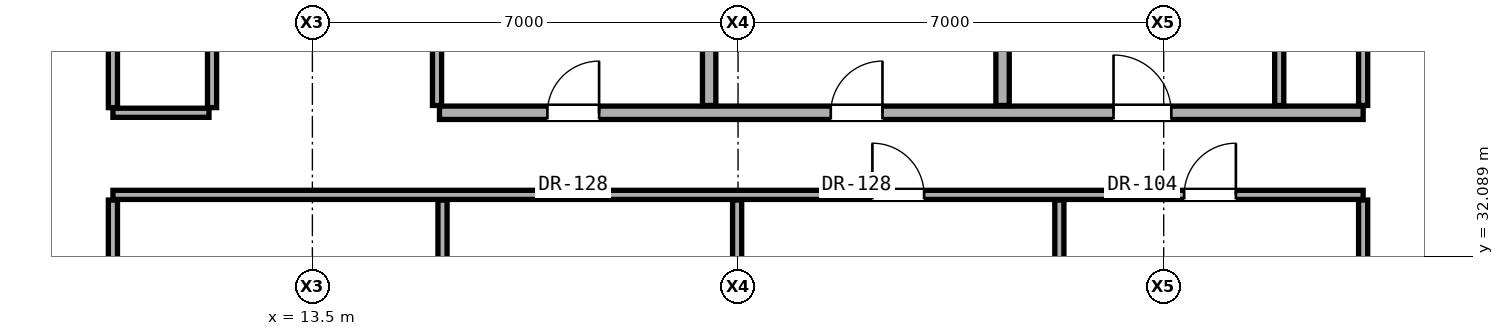
"""IFC4 building model, lengths in metres.
Left out: names, types, materials, properties, quantities, classifications, styles, units other than length and angle.
Written with IfcOpenShell. Run it as: python <this file> out.ifc"""

import sys

from ifc_helpers import new_model, si_unit, direction, frame, frame_2d, origin, place, context, subcontext, project, spatial, rectangle, extrude, element, fill, save


model = new_model("IFC4")
c1 = context("Model", 3, precision=1e-05, world=origin(), true_north=direction((0.0, 1.0)))
c2 = subcontext(c1, "Body", "Model", "MODEL_VIEW")
j1 = project(units=[si_unit("LENGTHUNIT", "METRE"), si_unit("PLANEANGLEUNIT", "RADIAN")], contexts=[c1])
p1 = place(None, origin())
s1 = spatial("IfcSite", under=j1, at=p1, CompositionType="ELEMENT")
p2 = place(p1, origin())
s2 = spatial("IfcBuilding", under=s1, at=p2, CompositionType="ELEMENT")
p3 = place(p2, frame((0.0, 0.0, 186.9)))
s3 = spatial("IfcBuildingStorey", under=s2, at=p3, CompositionType="ELEMENT", Elevation=186.9)
p4 = place(p3, frame((10.22, 33.1, 0.0), z_axis=(0.0, 0.0, 1.0), x_axis=(1.0, 0.0, 0.0)))
e1 = element("IfcWall", 1, at=p4, inside=s3, PredefinedType="PARTITIONING", context=c2, shape_type="SweptSolid", body=[
    extrude(rectangle(XDim=20.56, YDim=0.15, at=frame_2d((10.28, 0.0))), origin(), (0.0, 0.0, 1.0), 2.186),
])
p5 = place(p4, frame((12.49, 0.0, 0.0)))
e2 = element("IfcOpeningElement", 2, at=p5, cuts=e1, PredefinedType="OPENING", context=c2, shape_type="SweptSolid", body=[
    extrude(rectangle(XDim=0.85, YDim=2.01, at=frame_2d((0.425, 1.005))), frame((0.0, 0.085, 0.0), z_axis=(0.0, -1.0, 0.0), x_axis=(1.0, 0.0, 0.0)), (0.0, 0.0, 1.0), 0.17),
])
p6 = place(p4, frame((17.617, 0.0, 0.0)))
e3 = element("IfcOpeningElement", 3, at=p6, cuts=e1, PredefinedType="OPENING", context=c2, shape_type="SweptSolid", body=[
    extrude(rectangle(XDim=0.85, YDim=2.01, at=frame_2d((0.425, 1.005))), frame((0.0, 0.085, 0.0), z_axis=(0.0, -1.0, 0.0), x_axis=(1.0, 0.0, 0.0)), (0.0, 0.0, 1.0), 0.17),
])
p7 = place(p3, frame((10.22, 34.45, 0.0), z_axis=(0.0, 0.0, 1.0), x_axis=(1.0, 0.0, 0.0)))
e4 = element("IfcWall", 4, at=p7, inside=s3, PredefinedType="PARTITIONING", context=c2, shape_type="SweptSolid", body=[
    extrude(rectangle(XDim=1.58, YDim=0.15, at=frame_2d((0.79, 0.0))), origin(), (0.0, 0.0, 1.0), 2.186),
])
p8 = place(p3, frame((15.59, 34.45, 0.0), z_axis=(0.0, 0.0, 1.0), x_axis=(1.0, 0.0, 0.0)))
e5 = element("IfcWall", 5, at=p8, inside=s3, PredefinedType="SOLIDWALL", context=c2, shape_type="SweptSolid", body=[
    extrude(rectangle(XDim=15.19, YDim=0.22, at=frame_2d((7.595, 0.0))), origin(), (0.0, 0.0, 1.0), 2.186),
])
p9 = place(p8, frame((6.435, 0.0, 0.0)))
e6 = element("IfcOpeningElement", 6, at=p9, cuts=e5, PredefinedType="OPENING", context=c2, shape_type="SweptSolid", body=[
    extrude(rectangle(XDim=0.85, YDim=2.01, at=frame_2d((0.425, 1.005))), frame((0.0, 0.12, 0.0), z_axis=(0.0, -1.0, 0.0), x_axis=(1.0, 0.0, 0.0)), (0.0, 0.0, 1.0), 0.24),
])
p10 = place(p8, frame((11.085, 0.0, 0.0)))
e7 = element("IfcOpeningElement", 7, at=p10, cuts=e5, PredefinedType="OPENING", context=c2, shape_type="SweptSolid", body=[
    extrude(rectangle(XDim=0.95, YDim=2.15, at=frame_2d((0.475, 1.075))), frame((0.0, 0.12, 0.0), z_axis=(0.0, -1.0, 0.0), x_axis=(1.0, 0.0, 0.0)), (0.0, 0.0, 1.0), 0.24),
])
p11 = place(p8, frame((1.775, 0.0, 0.0)))
e8 = element("IfcOpeningElement", 8, at=p11, cuts=e5, PredefinedType="OPENING", context=c2, shape_type="SweptSolid", body=[
    extrude(rectangle(XDim=0.85, YDim=2.01, at=frame_2d((0.425, 1.005))), frame((0.0, 0.12, 0.0), z_axis=(0.0, -1.0, 0.0), x_axis=(1.0, 0.0, 0.0)), (0.0, 0.0, 1.0), 0.24),
])
p12 = place(p3, frame((10.22, 22.935, 0.0), z_axis=(0.0, 0.0, 1.0), x_axis=(0.0, 1.0, 0.0)))
e9 = element("IfcWall", 9, at=p12, inside=s3, PredefinedType="PARTITIONING", context=c2, shape_type="SweptSolid", body=[
    extrude(rectangle(XDim=10.08, YDim=0.15, at=frame_2d((5.04, 0.0))), origin(), (0.0, 0.0, 1.0), 2.346),
])
p13 = place(p12, frame((4.565, 0.0, 0.0)))
e10 = element("IfcOpeningElement", 10, at=p13, cuts=e9, PredefinedType="OPENING", context=c2, shape_type="SweptSolid", body=[
    extrude(rectangle(XDim=0.95, YDim=2.15, at=frame_2d((0.475, 1.075))), frame((0.0, 0.085, 0.0), z_axis=(0.0, -1.0, 0.0), x_axis=(1.0, 0.0, 0.0)), (0.0, 0.0, 1.0), 0.17),
])
p14 = place(p3, frame((10.22, 34.535, 0.0), z_axis=(0.0, 0.0, 1.0), x_axis=(0.0, 1.0, 0.0)))
e11 = element("IfcWall", 11, at=p14, inside=s3, PredefinedType="PARTITIONING", context=c2, shape_type="SweptSolid", body=[
    extrude(rectangle(XDim=9.13, YDim=0.15, at=frame_2d((4.565, 0.0))), origin(), (0.0, 0.0, 1.0), 2.442),
])
p15 = place(p3, frame((11.85, 34.535, 0.0), z_axis=(0.0, 0.0, 1.0), x_axis=(0.0, 1.0, 0.0)))
e12 = element("IfcWall", 12, at=p15, inside=s3, PredefinedType="PARTITIONING", context=c2, shape_type="SweptSolid", body=[
    extrude(rectangle(XDim=2.795, YDim=0.15, at=frame_2d((1.397, 0.0))), origin(), (0.0, 0.0, 1.0), 3.05),
])
p16 = place(p3, frame((15.64, 22.935, 0.0), z_axis=(0.0, 0.0, 1.0), x_axis=(0.0, 1.0, 0.0)))
e13 = element("IfcWall", 13, at=p16, inside=s3, PredefinedType="PARTITIONING", context=c2, shape_type="SweptSolid", body=[
    extrude(rectangle(XDim=10.08, YDim=0.15, at=frame_2d((5.04, 0.0))), origin(), (0.0, 0.0, 1.0), 2.186),
])
p17 = place(p3, frame((15.55, 34.57, 0.0), z_axis=(0.0, 0.0, 1.0), x_axis=(0.0, 1.0, 0.0)))
e14 = element("IfcWall", 14, at=p17, inside=s3, PredefinedType="PARTITIONING", context=c2, shape_type="SweptSolid", body=[
    extrude(rectangle(XDim=2.76, YDim=0.15, at=frame_2d((1.38, 0.0))), origin(), (0.0, 0.0, 1.0), 3.05),
])
p18 = place(p3, frame((20.025, 34.57, 0.0), z_axis=(0.0, 0.0, 1.0), x_axis=(0.0, 1.0, 0.0)))
e15 = element("IfcWall", 15, at=p18, inside=s3, PredefinedType="SOLIDWALL", context=c2, shape_type="SweptSolid", body=[
    extrude(rectangle(XDim=2.76, YDim=0.22, at=frame_2d((1.38, 0.0))), origin(), (0.0, 0.0, 1.0), 3.05),
])
p19 = place(p3, frame((20.485, 19.985, 0.0), z_axis=(0.0, 0.0, 1.0), x_axis=(0.0, 1.0, 0.0)))
e16 = element("IfcWall", 16, at=p19, inside=s3, PredefinedType="PARTITIONING", context=c2, shape_type="SweptSolid", body=[
    extrude(rectangle(XDim=13.03, YDim=0.15, at=frame_2d((6.515, 0.0))), origin(), (0.0, 0.0, 1.0), 2.186),
])
p20 = place(p3, frame((24.85, 34.57, 0.0), z_axis=(0.0, 0.0, 1.0), x_axis=(0.0, 1.0, 0.0)))
e17 = element("IfcWall", 17, at=p20, inside=s3, PredefinedType="SOLIDWALL", context=c2, shape_type="SweptSolid", body=[
    extrude(rectangle(XDim=2.76, YDim=0.22, at=frame_2d((1.38, 0.0))), origin(), (0.0, 0.0, 1.0), 3.05),
])
p21 = place(p3, frame((25.784, 19.985, 0.0), z_axis=(0.0, 0.0, 1.0), x_axis=(0.0, 1.0, 0.0)))
e18 = element("IfcWall", 18, at=p21, inside=s3, PredefinedType="PARTITIONING", context=c2, shape_type="SweptSolid", body=[
    extrude(rectangle(XDim=13.03, YDim=0.15, at=frame_2d((6.515, 0.0))), origin(), (0.0, 0.0, 1.0), 2.186),
])
p22 = place(p3, frame((29.4, 34.57, 0.0), z_axis=(0.0, 0.0, 1.0), x_axis=(0.0, 1.0, 0.0)))
e19 = element("IfcWall", 19, at=p22, inside=s3, PredefinedType="PARTITIONING", context=c2, shape_type="SweptSolid", body=[
    extrude(rectangle(XDim=2.76, YDim=0.15, at=frame_2d((1.38, 0.0))), origin(), (0.0, 0.0, 1.0), 3.05),
])
p23 = place(p3, frame((30.78, 19.985, 0.0), z_axis=(0.0, 0.0, 1.0), x_axis=(0.0, 1.0, 0.0)))
e20 = element("IfcWall", 20, at=p23, inside=s3, PredefinedType="PARTITIONING", context=c2, shape_type="SweptSolid", body=[
    extrude(rectangle(XDim=13.03, YDim=0.15, at=frame_2d((6.515, 0.0))), origin(), (0.0, 0.0, 1.0), 2.346),
])
p24 = place(p3, frame((30.78, 34.57, 0.0), z_axis=(0.0, 0.0, 1.0), x_axis=(0.0, 1.0, 0.0)))
e21 = element("IfcWall", 21, at=p24, inside=s3, PredefinedType="PARTITIONING", context=c2, shape_type="SweptSolid", body=[
    extrude(rectangle(XDim=9.095, YDim=0.15, at=frame_2d((4.547, 0.0))), origin(), (0.0, 0.0, 1.0), 2.442),
])
p25 = place(p9, origin())
e22 = element("IfcDoor", 22, at=p25, inside=s3, OperationType="SINGLE_SWING_RIGHT", PredefinedType="DOOR", context=c2, shape_type="SweptSolid", body=[
    extrude(rectangle(XDim=0.85, YDim=2.01, at=frame_2d((0.425, 1.005))), frame((0.0, 0.025, 0.0), z_axis=(0.0, -1.0, 0.0), x_axis=(1.0, 0.0, 0.0)), (0.0, 0.0, 1.0), 0.05),
])
fill(e6, e22)
p26 = place(p10, origin())
e23 = element("IfcDoor", 23, at=p26, inside=s3, OperationType="SINGLE_SWING_LEFT", PredefinedType="DOOR", context=c2, shape_type="SweptSolid", body=[
    extrude(rectangle(XDim=0.95, YDim=2.15, at=frame_2d((0.475, 1.075))), frame((0.0, 0.025, 0.0), z_axis=(0.0, -1.0, 0.0), x_axis=(1.0, 0.0, 0.0)), (0.0, 0.0, 1.0), 0.05),
])
fill(e7, e23)
p27 = place(p11, origin())
e24 = element("IfcDoor", 24, at=p27, inside=s3, OperationType="SINGLE_SWING_RIGHT", PredefinedType="DOOR", context=c2, shape_type="SweptSolid", body=[
    extrude(rectangle(XDim=0.85, YDim=2.01, at=frame_2d((0.425, 1.005))), frame((0.0, 0.025, 0.0), z_axis=(0.0, -1.0, 0.0), x_axis=(1.0, 0.0, 0.0)), (0.0, 0.0, 1.0), 0.05),
])
fill(e8, e24)
p28 = place(p5, origin())
e25 = element("IfcDoor", 25, at=p28, inside=s3, OperationType="SINGLE_SWING_LEFT", PredefinedType="DOOR", context=c2, shape_type="SweptSolid", body=[
    extrude(rectangle(XDim=0.85, YDim=2.01, at=frame_2d((0.425, 1.005))), frame((0.0, 0.025, 0.0), z_axis=(0.0, -1.0, 0.0), x_axis=(1.0, 0.0, 0.0)), (0.0, 0.0, 1.0), 0.05),
])
fill(e2, e25)
p29 = place(p6, origin())
e26 = element("IfcDoor", 26, at=p29, inside=s3, OperationType="SINGLE_SWING_RIGHT", PredefinedType="DOOR", context=c2, shape_type="SweptSolid", body=[
    extrude(rectangle(XDim=0.85, YDim=2.01, at=frame_2d((0.425, 1.005))), frame((0.0, 0.025, 0.0), z_axis=(0.0, -1.0, 0.0), x_axis=(1.0, 0.0, 0.0)), (0.0, 0.0, 1.0), 0.05),
])
fill(e3, e26)
save(model, sys.argv[1])
